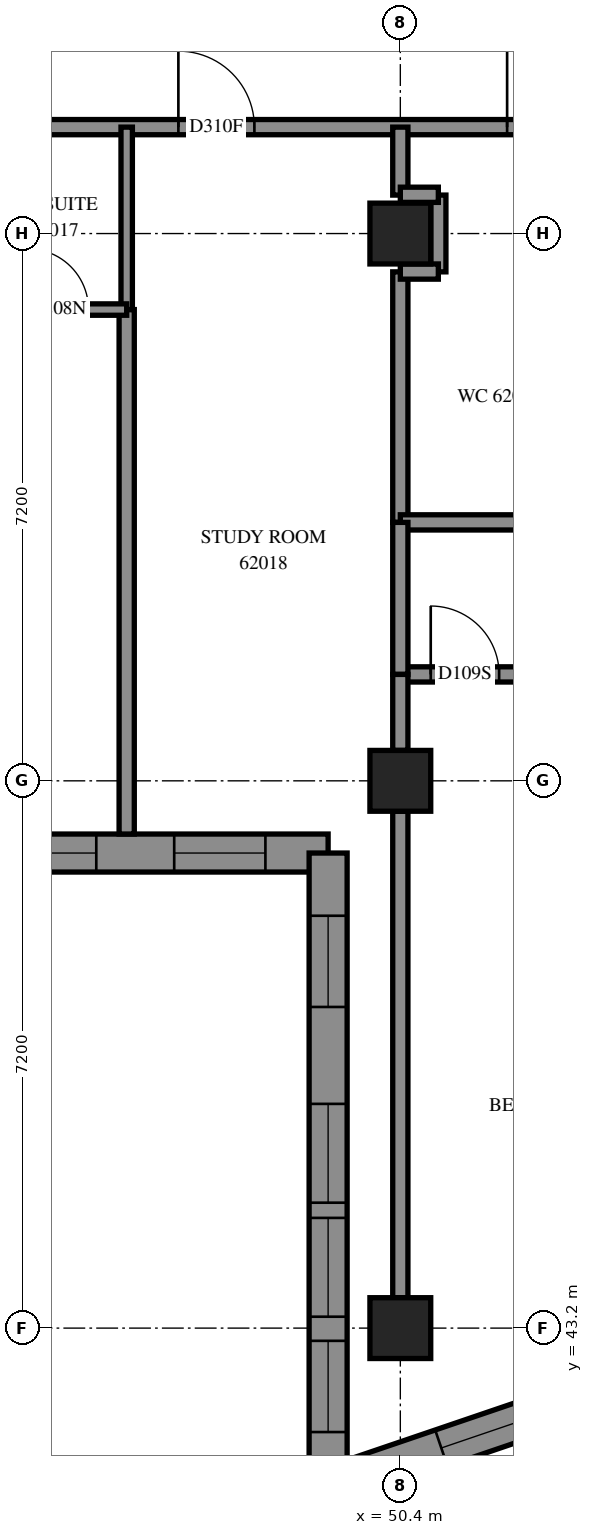
"""IFC4 building model, lengths in metres.
Left out: names, types, materials, properties, quantities, classifications, styles, units other than length and angle.
Written with IfcOpenShell. Run it as: python <this file> out.ifc"""

import sys

from ifc_helpers import new_model, si_unit, direction, frame, frame_2d, origin, origin_2d, place, context, subcontext, project, spatial, polyline, rectangle, outline, extrude, element, fill, save


model = new_model("IFC4")
c1 = context("Model", 3, precision=1e-05, world=origin(), true_north=direction((0.0, 1.0)))
c2 = subcontext(c1, "Body", "Model", "MODEL_VIEW")
j1 = project(units=[si_unit("LENGTHUNIT", "METRE"), si_unit("PLANEANGLEUNIT", "RADIAN")], contexts=[c1])
p1 = place(None, origin())
s1 = spatial("IfcSite", under=j1, at=p1, CompositionType="ELEMENT")
p2 = place(p1, origin())
s2 = spatial("IfcBuilding", under=s1, at=p2, CompositionType="ELEMENT")
p3 = place(p2, frame((0.0, 0.0, 227.0)))
s3 = spatial("IfcBuildingStorey", under=s2, at=p3, CompositionType="ELEMENT", Elevation=227.0)
for number, where, z_axis, x_axis in (
    (1, (50.4, 43.2, 0.0), (0.0, 0.0, 1.0), (1.0, 0.0, 0.0)),
    (2, (50.4, 50.4, 0.0), (0.0, 0.0, 1.0), (1.0, 0.0, 0.0)),
    (3, (50.4, 57.6, 0.0), (0.0, 0.0, 1.0), (1.0, 0.0, 0.0)),
):
    element("IfcColumn", number, at=place(p3, frame(where, z_axis=z_axis, x_axis=x_axis)), inside=s3, PredefinedType="COLUMN", context=c2, shape_type="SweptSolid", body=[
        extrude(rectangle(XDim=0.8, YDim=0.8, at=origin_2d()), origin(), (0.0, 0.0, 1.0), 3.1),
    ])
p4 = place(p3, frame((42.25, 49.45, 0.0), z_axis=(0.0, 0.0, 1.0), x_axis=(1.0, 0.0, 0.0)))
e4 = element("IfcWall", 4, at=p4, inside=s3, PredefinedType="SOLIDWALL", context=c2, shape_type="SweptSolid", body=[
    extrude(outline(polyline([(-0.25, -0.25), (6.95, -0.25), (7.45, 0.25), (0.25, 0.25), (-0.25, -0.25)])), origin(), (0.0, 0.0, 1.0), 3.1),
])
p5 = place(p4, frame((1.35, 0.0, 0.45)))
e5 = element("IfcOpeningElement", 5, at=p5, cuts=e4, PredefinedType="OPENING", context=c2, shape_type="SweptSolid", body=[
    extrude(rectangle(XDim=1.3, YDim=2.5, at=frame_2d((0.65, 1.25))), frame((0.0, 0.26, 0.0), z_axis=(0.0, -1.0, 0.0), x_axis=(1.0, 0.0, 0.0)), (0.0, 0.0, 1.0), 0.52),
])
p6 = place(p4, frame((2.85, 0.0, 0.45)))
e6 = element("IfcOpeningElement", 6, at=p6, cuts=e4, PredefinedType="OPENING", context=c2, shape_type="SweptSolid", body=[
    extrude(rectangle(XDim=1.3, YDim=2.5, at=frame_2d((0.65, 1.25))), frame((0.0, 0.26, 0.0), z_axis=(0.0, -1.0, 0.0), x_axis=(1.0, 0.0, 0.0)), (0.0, 0.0, 1.0), 0.52),
])
p7 = place(p4, frame((5.175, 0.0, 0.45)))
e7 = element("IfcOpeningElement", 7, at=p7, cuts=e4, PredefinedType="OPENING", context=c2, shape_type="SweptSolid", body=[
    extrude(rectangle(XDim=1.2, YDim=2.5, at=frame_2d((0.6, 1.25))), frame((0.0, 0.26, 0.0), z_axis=(0.0, -1.0, 0.0), x_axis=(1.0, 0.0, 0.0)), (0.0, 0.0, 1.0), 0.52),
])
p8 = place(p3, frame((49.45, 49.45, 0.0), z_axis=(0.0, 0.0, 1.0), x_axis=(0.0, -1.0, 0.0)))
e8 = element("IfcWall", 8, at=p8, inside=s3, PredefinedType="SOLIDWALL", context=c2, shape_type="SweptSolid", body=[
    extrude(outline(polyline([(0.25, -0.25), (8.683, -0.25), (7.985, 0.25), (-0.25, 0.25), (0.25, -0.25)])), origin(), (0.0, 0.0, 1.0), 3.1),
])
p9 = place(p8, frame((3.3, 0.0, 0.45)))
e9 = element("IfcOpeningElement", 9, at=p9, cuts=e8, PredefinedType="OPENING", context=c2, shape_type="SweptSolid", body=[
    extrude(rectangle(XDim=1.3, YDim=2.5, at=frame_2d((0.65, 1.25))), frame((0.0, 0.26, 0.0), z_axis=(0.0, -1.0, 0.0), x_axis=(1.0, 0.0, 0.0)), (0.0, 0.0, 1.0), 0.52),
])
p10 = place(p8, frame((4.8, 0.0, 0.45)))
e10 = element("IfcOpeningElement", 10, at=p10, cuts=e8, PredefinedType="OPENING", context=c2, shape_type="SweptSolid", body=[
    extrude(rectangle(XDim=1.3, YDim=2.5, at=frame_2d((0.65, 1.25))), frame((0.0, 0.26, 0.0), z_axis=(0.0, -1.0, 0.0), x_axis=(1.0, 0.0, 0.0)), (0.0, 0.0, 1.0), 0.52),
])
p11 = place(p8, frame((0.825, 0.0, 0.45)))
e11 = element("IfcOpeningElement", 11, at=p11, cuts=e8, PredefinedType="OPENING", context=c2, shape_type="SweptSolid", body=[
    extrude(rectangle(XDim=1.2, YDim=2.5, at=frame_2d((0.6, 1.25))), frame((0.0, 0.26, 0.0), z_axis=(0.0, -1.0, 0.0), x_axis=(1.0, 0.0, 0.0)), (0.0, 0.0, 1.0), 0.52),
])
p12 = place(p8, frame((6.417, 0.0, 0.45)))
e12 = element("IfcOpeningElement", 12, at=p12, cuts=e8, PredefinedType="OPENING", context=c2, shape_type="SweptSolid", body=[
    extrude(rectangle(XDim=1.2, YDim=2.5, at=frame_2d((0.6, 1.25))), frame((0.0, 0.26, 0.0), z_axis=(0.0, -1.0, 0.0), x_axis=(1.0, 0.0, 0.0)), (0.0, 0.0, 1.0), 0.52),
])
p13 = place(p3, frame((49.45, 41.116, 0.0), z_axis=(0.0, 0.0, 1.0), x_axis=(0.9466887442, 0.3221496883, 0.0)))
e13 = element("IfcWall", 13, at=p13, inside=s3, PredefinedType="SOLIDWALL", context=c2, shape_type="SweptSolid", body=[
    extrude(outline(polyline([(-0.349, -0.25), (3.478, -0.25), (3.606, 0.25), (0.349, 0.25), (-0.349, -0.25)])), origin(), (0.0, 0.0, 1.0), 3.1),
])
p14 = place(p13, frame((1.573, 0.0, 0.45)))
e14 = element("IfcOpeningElement", 14, at=p14, cuts=e13, PredefinedType="OPENING", context=c2, shape_type="SweptSolid", body=[
    extrude(rectangle(XDim=1.2, YDim=2.5, at=frame_2d((0.6, 1.25))), frame((0.0, 0.26, 0.0), z_axis=(0.0, -1.0, 0.0), x_axis=(1.0, 0.0, 0.0)), (0.0, 0.0, 1.0), 0.52),
])
p15 = place(p3, frame((36.0, 59.0, 0.0), z_axis=(0.0, 0.0, 1.0), x_axis=(1.0, 0.0, 0.0)))
e15 = element("IfcWall", 15, at=p15, inside=s3, PredefinedType="PARTITIONING", context=c2, shape_type="SweptSolid", body=[
    extrude(rectangle(XDim=17.0, YDim=0.2, at=frame_2d((8.5, 0.0))), origin(), (0.0, 0.0, 1.0), 3.1),
])
p16 = place(p15, frame((3.862, 0.0, 0.0)))
e16 = element("IfcOpeningElement", 16, at=p16, cuts=e15, PredefinedType="OPENING", context=c2, shape_type="SweptSolid", body=[
    extrude(rectangle(XDim=1.0, YDim=2.1, at=frame_2d((0.5, 1.05))), frame((0.0, 0.11, 0.0), z_axis=(0.0, -1.0, 0.0), x_axis=(1.0, 0.0, 0.0)), (0.0, 0.0, 1.0), 0.22),
])
p17 = place(p15, frame((7.6, 0.0, 0.0)))
e17 = element("IfcOpeningElement", 17, at=p17, cuts=e15, PredefinedType="OPENING", context=c2, shape_type="SweptSolid", body=[
    extrude(rectangle(XDim=0.9, YDim=2.1, at=frame_2d((0.45, 1.05))), frame((0.0, 0.11, 0.0), z_axis=(0.0, -1.0, 0.0), x_axis=(1.0, 0.0, 0.0)), (0.0, 0.0, 1.0), 0.22),
])
p18 = place(p15, frame((11.48, 0.0, 0.0)))
e18 = element("IfcOpeningElement", 18, at=p18, cuts=e15, PredefinedType="OPENING", context=c2, shape_type="SweptSolid", body=[
    extrude(rectangle(XDim=1.0, YDim=2.1, at=frame_2d((0.5, 1.05))), frame((0.0, 0.11, 0.0), z_axis=(0.0, -1.0, 0.0), x_axis=(1.0, 0.0, 0.0)), (0.0, 0.0, 1.0), 0.22),
])
p19 = place(p15, frame((15.805, 0.0, 0.0)))
e19 = element("IfcOpeningElement", 19, at=p19, cuts=e15, PredefinedType="OPENING", context=c2, shape_type="SweptSolid", body=[
    extrude(rectangle(XDim=1.0, YDim=2.1, at=frame_2d((0.5, 1.05))), frame((0.0, 0.11, 0.0), z_axis=(0.0, -1.0, 0.0), x_axis=(1.0, 0.0, 0.0)), (0.0, 0.0, 1.0), 0.22),
])
p20 = place(p3, frame((46.8, 49.7, 0.0), z_axis=(0.0, 0.0, 1.0), x_axis=(0.0, 1.0, 0.0)))
e20 = element("IfcWall", 20, at=p20, inside=s3, PredefinedType="PARTITIONING", context=c2, shape_type="SweptSolid", body=[
    extrude(rectangle(XDim=6.9, YDim=0.2, at=frame_2d((3.45, 0.0))), origin(), (0.0, 0.0, 1.0), 3.1),
])
p21 = place(p3, frame((50.4, 43.6, 0.0), z_axis=(0.0, 0.0, 1.0), x_axis=(0.0, 1.0, 0.0)))
e21 = element("IfcWall", 21, at=p21, inside=s3, PredefinedType="PARTITIONING", context=c2, shape_type="SweptSolid", body=[
    extrude(rectangle(XDim=6.4, YDim=0.2, at=frame_2d((3.2, 0.0))), origin(), (0.0, 0.0, 1.0), 2.6),
])
p22 = place(p3, frame((50.4, 51.8, 0.0), z_axis=(0.0, 0.0, 1.0), x_axis=(1.0, 0.0, 0.0)))
e22 = element("IfcWall", 22, at=p22, inside=s3, PredefinedType="PARTITIONING", context=c2, shape_type="SweptSolid", body=[
    extrude(rectangle(XDim=5.2, YDim=0.2, at=frame_2d((2.6, 0.0))), origin(), (0.0, 0.0, 1.0), 3.1),
])
p23 = place(p22, frame((0.4, 0.0, 0.0)))
e23 = element("IfcOpeningElement", 23, at=p23, cuts=e22, PredefinedType="OPENING", context=c2, shape_type="SweptSolid", body=[
    extrude(rectangle(XDim=0.9, YDim=2.1, at=frame_2d((0.45, 1.05))), frame((0.0, 0.11, 0.0), z_axis=(0.0, -1.0, 0.0), x_axis=(1.0, 0.0, 0.0)), (0.0, 0.0, 1.0), 0.22),
])
p24 = place(p22, frame((3.946, 0.0, 0.0)))
e24 = element("IfcOpeningElement", 24, at=p24, cuts=e22, PredefinedType="OPENING", context=c2, shape_type="SweptSolid", body=[
    extrude(rectangle(XDim=1.0, YDim=2.1, at=frame_2d((0.5, 1.05))), frame((0.0, 0.11, 0.0), z_axis=(0.0, -1.0, 0.0), x_axis=(1.0, 0.0, 0.0)), (0.0, 0.0, 1.0), 0.22),
])
p25 = place(p3, frame((50.4, 53.8, 0.0), z_axis=(0.0, 0.0, 1.0), x_axis=(0.0, 1.0, 0.0)))
e25 = element("IfcWall", 25, at=p25, inside=s3, PredefinedType="PARTITIONING", context=c2, shape_type="SweptSolid", body=[
    extrude(rectangle(XDim=3.296, YDim=0.2, at=frame_2d((1.648, 0.0))), origin(), (0.0, 0.0, 1.0), 3.1),
])
p26 = place(p3, frame((50.4, 53.8, 0.0), z_axis=(0.0, 0.0, 1.0), x_axis=(1.0, 0.0, 0.0)))
e26 = element("IfcWall", 26, at=p26, inside=s3, PredefinedType="PARTITIONING", context=c2, shape_type="SweptSolid", body=[
    extrude(rectangle(XDim=2.6, YDim=0.2, at=frame_2d((1.3, 0.0))), origin(), (0.0, 0.0, 1.0), 3.1),
])
p27 = place(p3, frame((46.8, 56.6, 0.0), z_axis=(0.0, 0.0, 1.0), x_axis=(0.0, 1.0, 0.0)))
e27 = element("IfcWall", 27, at=p27, inside=s3, PredefinedType="PARTITIONING", context=c2, shape_type="SweptSolid", body=[
    extrude(rectangle(XDim=2.4, YDim=0.15, at=frame_2d((1.2, 0.0))), origin(), (0.0, 0.0, 1.0), 3.1),
])
p28 = place(p3, frame((50.4, 51.8, 0.0), z_axis=(0.0, 0.0, 1.0), x_axis=(0.0, 1.0, 0.0)))
e28 = element("IfcWall", 28, at=p28, inside=s3, PredefinedType="PARTITIONING", context=c2, shape_type="SweptSolid", body=[
    extrude(rectangle(XDim=2.0, YDim=0.2, at=frame_2d((1.0, 0.0))), origin(), (0.0, 0.0, 1.0), 3.1),
])
p29 = place(p3, frame((44.9, 56.6, 0.0), z_axis=(0.0, 0.0, 1.0), x_axis=(1.0, 0.0, 0.0)))
e29 = element("IfcWall", 29, at=p29, inside=s3, PredefinedType="PARTITIONING", context=c2, shape_type="SweptSolid", body=[
    extrude(rectangle(XDim=1.9, YDim=0.15, at=frame_2d((0.95, 0.0))), origin(), (0.0, 0.0, 1.0), 3.1),
])
p30 = place(p29, frame((0.598, 0.0, 0.0)))
e30 = element("IfcOpeningElement", 30, at=p30, cuts=e29, PredefinedType="OPENING", context=c2, shape_type="SweptSolid", body=[
    extrude(rectangle(XDim=0.8, YDim=2.1, at=frame_2d((0.4, 1.05))), frame((0.0, 0.085, 0.0), z_axis=(0.0, -1.0, 0.0), x_axis=(1.0, 0.0, 0.0)), (0.0, 0.0, 1.0), 0.17),
])
p31 = place(p3, frame((50.9, 57.096, 0.0), z_axis=(0.0, 0.0, 1.0), x_axis=(0.0, 1.0, 0.0)))
e31 = element("IfcWall", 31, at=p31, inside=s3, PredefinedType="PARTITIONING", context=c2, shape_type="SweptSolid", body=[
    extrude(rectangle(XDim=1.01, YDim=0.2, at=frame_2d((0.505, 0.0))), origin(), (0.0, 0.0, 1.0), 3.1),
])
p32 = place(p3, frame((50.4, 50.8, 0.0), z_axis=(0.0, 0.0, 1.0), x_axis=(0.0, 1.0, 0.0)))
e32 = element("IfcWall", 32, at=p32, inside=s3, PredefinedType="PARTITIONING", context=c2, shape_type="SweptSolid", body=[
    extrude(rectangle(XDim=1.0, YDim=0.2, at=frame_2d((0.5, 0.0))), origin(), (0.0, 0.0, 1.0), 3.1),
])
p33 = place(p3, frame((50.4, 58.106, 0.0), z_axis=(0.0, 0.0, 1.0), x_axis=(0.0, 1.0, 0.0)))
e33 = element("IfcWall", 33, at=p33, inside=s3, PredefinedType="PARTITIONING", context=c2, shape_type="SweptSolid", body=[
    extrude(rectangle(XDim=0.894, YDim=0.2, at=frame_2d((0.447, 0.0))), origin(), (0.0, 0.0, 1.0), 3.1),
])
for number, where, z_axis, x_axis in (
    (34, (50.4, 58.11, 0.0), (0.0, 0.0, 1.0), (1.0, 0.0, 0.0)),
    (35, (50.4, 57.1, 0.0), (0.0, 0.0, 1.0), (1.0, 0.0, 0.0)),
):
    element("IfcWall", number, at=place(p3, frame(where, z_axis=z_axis, x_axis=x_axis)), inside=s3, PredefinedType="PARTITIONING", context=c2, shape_type="SweptSolid", body=[
        extrude(rectangle(XDim=0.5, YDim=0.2, at=frame_2d((0.25, 0.0))), origin(), (0.0, 0.0, 1.0), 3.1),
    ])
p34 = place(p6, origin())
e36 = element("IfcWindow", 36, at=p34, inside=s3, PartitioningType="SINGLE_PANEL", PredefinedType="WINDOW", context=c2, shape_type="SweptSolid", body=[
    extrude(rectangle(XDim=1.3, YDim=2.5, at=frame_2d((0.65, 1.25))), frame((0.0, 0.18, 0.0), z_axis=(0.0, -1.0, 0.0), x_axis=(1.0, 0.0, 0.0)), (0.0, 0.0, 1.0), 0.06),
])
fill(e6, e36)
p35 = place(p7, origin())
e37 = element("IfcWindow", 37, at=p35, inside=s3, PartitioningType="SINGLE_PANEL", PredefinedType="WINDOW", context=c2, shape_type="SweptSolid", body=[
    extrude(rectangle(XDim=1.2, YDim=2.5, at=frame_2d((0.6, 1.25))), frame((0.0, 0.18, 0.0), z_axis=(0.0, -1.0, 0.0), x_axis=(1.0, 0.0, 0.0)), (0.0, 0.0, 1.0), 0.06),
])
fill(e7, e37)
p36 = place(p9, origin())
e38 = element("IfcWindow", 38, at=p36, inside=s3, PartitioningType="SINGLE_PANEL", PredefinedType="WINDOW", context=c2, shape_type="SweptSolid", body=[
    extrude(rectangle(XDim=1.3, YDim=2.5, at=frame_2d((0.65, 1.25))), frame((0.0, 0.18, 0.0), z_axis=(0.0, -1.0, 0.0), x_axis=(1.0, 0.0, 0.0)), (0.0, 0.0, 1.0), 0.06),
])
fill(e9, e38)
p37 = place(p10, origin())
e39 = element("IfcWindow", 39, at=p37, inside=s3, PartitioningType="SINGLE_PANEL", PredefinedType="WINDOW", context=c2, shape_type="SweptSolid", body=[
    extrude(rectangle(XDim=1.3, YDim=2.5, at=frame_2d((0.65, 1.25))), frame((0.0, 0.18, 0.0), z_axis=(0.0, -1.0, 0.0), x_axis=(1.0, 0.0, 0.0)), (0.0, 0.0, 1.0), 0.06),
])
fill(e10, e39)
p38 = place(p11, origin())
e40 = element("IfcWindow", 40, at=p38, inside=s3, PartitioningType="SINGLE_PANEL", PredefinedType="WINDOW", context=c2, shape_type="SweptSolid", body=[
    extrude(rectangle(XDim=1.2, YDim=2.5, at=frame_2d((0.6, 1.25))), frame((0.0, 0.18, 0.0), z_axis=(0.0, -1.0, 0.0), x_axis=(1.0, 0.0, 0.0)), (0.0, 0.0, 1.0), 0.06),
])
fill(e11, e40)
p39 = place(p12, origin())
e41 = element("IfcWindow", 41, at=p39, inside=s3, PartitioningType="SINGLE_PANEL", PredefinedType="WINDOW", context=c2, shape_type="SweptSolid", body=[
    extrude(rectangle(XDim=1.2, YDim=2.5, at=frame_2d((0.6, 1.25))), frame((0.0, 0.18, 0.0), z_axis=(0.0, -1.0, 0.0), x_axis=(1.0, 0.0, 0.0)), (0.0, 0.0, 1.0), 0.06),
])
fill(e12, e41)
p40 = place(p14, origin())
e42 = element("IfcWindow", 42, at=p40, inside=s3, PartitioningType="SINGLE_PANEL", PredefinedType="WINDOW", context=c2, shape_type="SweptSolid", body=[
    extrude(rectangle(XDim=1.2, YDim=2.5, at=frame_2d((0.6, 1.25))), frame((0.0, 0.18, 0.0), z_axis=(0.0, -1.0, 0.0), x_axis=(1.0, 0.0, 0.0)), (0.0, 0.0, 1.0), 0.06),
])
fill(e14, e42)
p41 = place(p30, origin())
e43 = element("IfcDoor", 43, at=p41, inside=s3, OperationType="SINGLE_SWING_RIGHT", PredefinedType="DOOR", context=c2, shape_type="SweptSolid", body=[
    extrude(rectangle(XDim=0.8, YDim=2.1, at=frame_2d((0.4, 1.05))), frame((0.0, 0.025, 0.0), z_axis=(0.0, -1.0, 0.0), x_axis=(1.0, 0.0, 0.0)), (0.0, 0.0, 1.0), 0.05),
])
fill(e30, e43)
p42 = place(p18, origin())
e44 = element("IfcDoor", 44, at=p42, inside=s3, OperationType="SINGLE_SWING_RIGHT", PredefinedType="DOOR", context=c2, shape_type="SweptSolid", body=[
    extrude(rectangle(XDim=1.0, YDim=2.1, at=frame_2d((0.5, 1.05))), frame((0.0, 0.025, 0.0), z_axis=(0.0, -1.0, 0.0), x_axis=(1.0, 0.0, 0.0)), (0.0, 0.0, 1.0), 0.05),
])
fill(e18, e44)
p43 = place(p19, origin())
e45 = element("IfcDoor", 45, at=p43, inside=s3, OperationType="SINGLE_SWING_LEFT", PredefinedType="DOOR", context=c2, shape_type="SweptSolid", body=[
    extrude(rectangle(XDim=1.0, YDim=2.1, at=frame_2d((0.5, 1.05))), frame((0.0, 0.025, 0.0), z_axis=(0.0, -1.0, 0.0), x_axis=(1.0, 0.0, 0.0)), (0.0, 0.0, 1.0), 0.05),
])
fill(e19, e45)
p44 = place(p23, origin())
e46 = element("IfcDoor", 46, at=p44, inside=s3, OperationType="SINGLE_SWING_LEFT", PredefinedType="DOOR", context=c2, shape_type="SweptSolid", body=[
    extrude(rectangle(XDim=0.9, YDim=2.1, at=frame_2d((0.45, 1.05))), frame((0.0, 0.025, 0.0), z_axis=(0.0, -1.0, 0.0), x_axis=(1.0, 0.0, 0.0)), (0.0, 0.0, 1.0), 0.05),
])
fill(e23, e46)
save(model, sys.argv[1])
